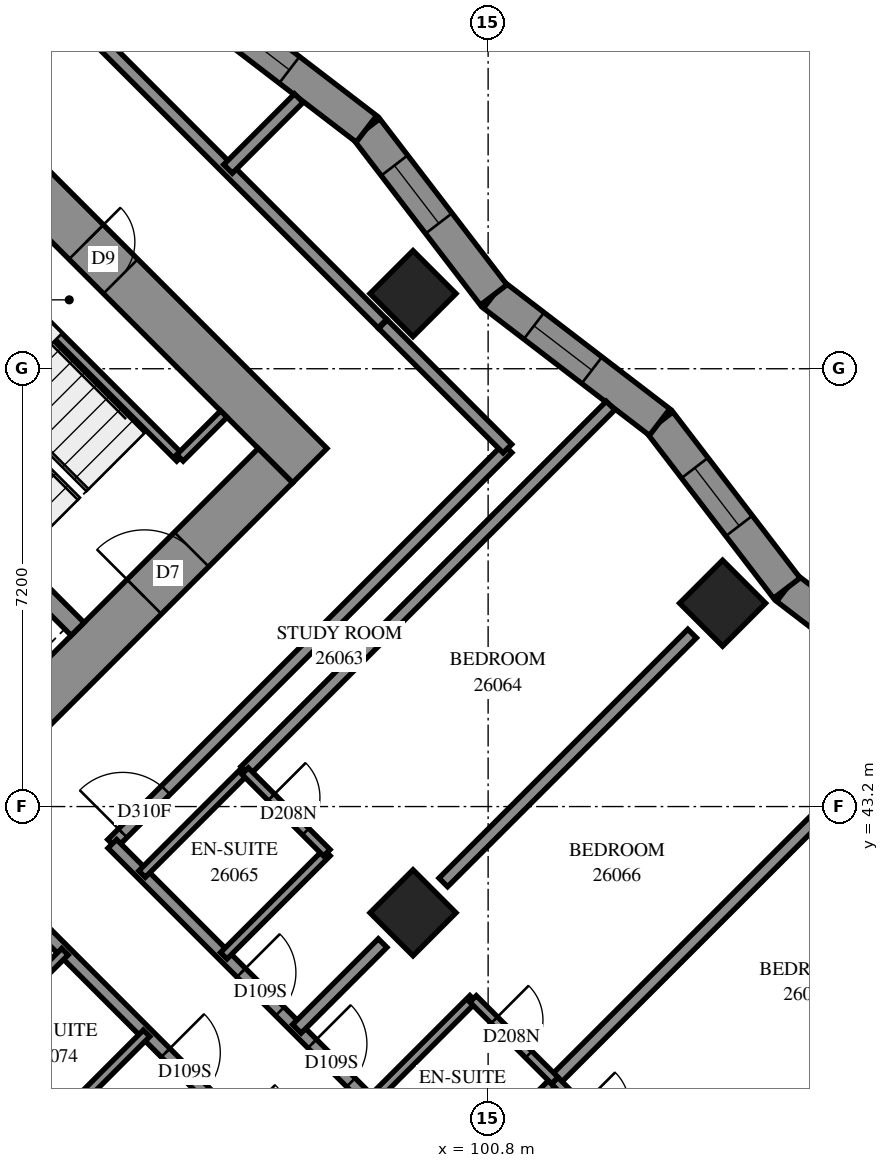
"""IFC4 building model, lengths in metres.
Left out: names, types, materials, properties, quantities, classifications, styles, units other than length and angle.
Written with IfcOpenShell. Run it as: python <this file> out.ifc"""

import sys

from ifc_helpers import new_model, si_unit, direction, frame, frame_2d, origin, origin_2d, place, context, subcontext, project, spatial, polyline, rectangle, outline, extrude, element, fill, save


model = new_model("IFC4")
c1 = context("Model", 3, precision=1e-05, world=origin(), true_north=direction((0.0, 1.0)))
c2 = subcontext(c1, "Body", "Model", "MODEL_VIEW")
j1 = project(units=[si_unit("LENGTHUNIT", "METRE"), si_unit("PLANEANGLEUNIT", "RADIAN")], contexts=[c1])
p1 = place(None, origin())
s1 = spatial("IfcSite", under=j1, at=p1, CompositionType="ELEMENT")
p2 = place(p1, origin())
s2 = spatial("IfcBuilding", under=s1, at=p2, CompositionType="ELEMENT")
p3 = place(p2, frame((0.0, 0.0, 98.2)))
s3 = spatial("IfcBuildingStorey", under=s2, at=p3, CompositionType="ELEMENT", Elevation=98.2)
for number, where, z_axis, x_axis in (
    (1, (99.565, 51.635, 0.0), (0.0, 0.0, 1.0), (0.707, -0.707, 0.0)),
    (2, (104.656, 46.544, 0.0), (0.0, 0.0, 1.0), (0.707, -0.707, 0.0)),
    (3, (99.565, 41.453, 0.0), (0.0, 0.0, 1.0), (0.707, -0.707, 0.0)),
):
    element("IfcColumn", number, at=place(p3, frame(where, z_axis=z_axis, x_axis=x_axis)), inside=s3, PredefinedType="COLUMN", context=c2, shape_type="SweptSolid", body=[
        extrude(rectangle(XDim=1.0, YDim=1.0, at=origin_2d()), origin(), (0.0, 0.0, 1.0), 3.1),
    ])
p4 = place(p3, frame((86.554, 60.121, -0.3), z_axis=(0.0, 0.0, 1.0), x_axis=(0.7071067812, -0.7071067812, 0.0)))
e4 = element("IfcWall", 4, at=p4, inside=s3, PredefinedType="SHEAR", context=c2, shape_type="SweptSolid", body=[
    extrude(rectangle(XDim=16.0, YDim=0.8, at=frame_2d((8.0, 0.0))), origin(), (0.0, 0.0, 1.0), 2.7),
])
p5 = place(p4, frame((10.8, 0.0, 0.3)))
e5 = element("IfcOpeningElement", 5, at=p5, cuts=e4, PredefinedType="OPENING", context=c2, shape_type="SweptSolid", body=[
    extrude(rectangle(XDim=0.8, YDim=2.1, at=frame_2d((0.4, 1.05))), frame((0.0, 0.41, 0.0), z_axis=(0.0, -1.0, 0.0), x_axis=(1.0, 0.0, 0.0)), (0.0, 0.0, 1.0), 0.82),
])
p6 = place(p3, frame((87.12, 38.625, -0.3), z_axis=(0.0, 0.0, 1.0), x_axis=(0.7071067812, 0.7071067812, 0.0)))
e6 = element("IfcWall", 6, at=p6, inside=s3, PredefinedType="SHEAR", context=c2, shape_type="SweptSolid", body=[
    extrude(rectangle(XDim=14.4, YDim=0.8, at=frame_2d((7.2, 0.0))), origin(), (0.0, 0.0, 1.0), 2.7),
])
p7 = place(p6, frame((4.55, 0.0, 0.3)))
e7 = element("IfcOpeningElement", 7, at=p7, cuts=e6, PredefinedType="OPENING", context=c2, shape_type="SweptSolid", body=[
    extrude(rectangle(XDim=1.1, YDim=2.1, at=frame_2d((0.55, 1.05))), frame((0.0, 0.41, 0.0), z_axis=(0.0, -1.0, 0.0), x_axis=(1.0, 0.0, 0.0)), (0.0, 0.0, 1.0), 0.82),
])
p8 = place(p6, frame((11.35, 0.0, 0.3)))
e8 = element("IfcOpeningElement", 8, at=p8, cuts=e6, PredefinedType="OPENING", context=c2, shape_type="SweptSolid", body=[
    extrude(rectangle(XDim=1.1, YDim=2.1, at=frame_2d((0.55, 1.05))), frame((0.0, 0.41, 0.0), z_axis=(0.0, -1.0, 0.0), x_axis=(1.0, 0.0, 0.0)), (0.0, 0.0, 1.0), 0.82),
])
p9 = place(p3, frame((88.958, 51.211, 0.0), z_axis=(0.0, 0.0, 1.0), x_axis=(0.7070998367, -0.7071137256, 0.0)))
e9 = element("IfcWall", 9, at=p9, inside=s3, PredefinedType="SOLIDWALL", context=c2, shape_type="SweptSolid", body=[
    extrude(rectangle(XDim=7.2, YDim=0.3, at=frame_2d((3.6, 0.0))), origin(), (0.0, 0.0, 1.0), 3.1),
])
p10 = place(p3, frame((108.442, 44.7, 0.0), z_axis=(0.0, 0.0, 1.0), x_axis=(-0.7937392534, 0.6082581669, 0.0)))
e10 = element("IfcWall", 10, at=p10, inside=s3, PredefinedType="SOLIDWALL", context=c2, shape_type="SweptSolid", body=[
    extrude(outline(polyline([(-0.036, -0.275), (3.403, -0.275), (3.475, 0.275), (0.036, 0.275), (-0.036, -0.275)])), origin(), (0.0, 0.0, 1.0), 3.1),
])
p11 = place(p10, frame((1.212, 0.0, 0.5)))
e11 = element("IfcOpeningElement", 11, at=p11, cuts=e10, PredefinedType="OPENING", context=c2, shape_type="SweptSolid", body=[
    extrude(rectangle(XDim=1.2, YDim=2.45, at=frame_2d((0.6, 1.225))), frame((0.0, 0.285, 0.0), z_axis=(0.0, -1.0, 0.0), x_axis=(1.0, 0.0, 0.0)), (0.0, 0.0, 1.0), 0.57),
])
p12 = place(p3, frame((105.712, 46.792, 0.0), z_axis=(0.0, 0.0, 1.0), x_axis=(-0.6082581669, 0.7937392534, 0.0)))
e12 = element("IfcWall", 12, at=p12, inside=s3, PredefinedType="SOLIDWALL", context=c2, shape_type="SweptSolid", body=[
    extrude(outline(polyline([(0.036, -0.275), (3.475, -0.275), (3.403, 0.275), (-0.036, 0.275), (0.036, -0.275)])), origin(), (0.0, 0.0, 1.0), 3.1),
])
p13 = place(p12, frame((1.29, 0.0, 0.5)))
e13 = element("IfcOpeningElement", 13, at=p13, cuts=e12, PredefinedType="OPENING", context=c2, shape_type="SweptSolid", body=[
    extrude(rectangle(XDim=1.2, YDim=2.45, at=frame_2d((0.6, 1.225))), frame((0.0, 0.285, 0.0), z_axis=(0.0, -1.0, 0.0), x_axis=(1.0, 0.0, 0.0)), (0.0, 0.0, 1.0), 0.57),
])
p14 = place(p3, frame((103.621, 49.522, 0.0), z_axis=(0.0, 0.0, 1.0), x_axis=(-0.7937392534, 0.6082581669, 0.0)))
e14 = element("IfcWall", 14, at=p14, inside=s3, PredefinedType="SOLIDWALL", context=c2, shape_type="SweptSolid", body=[
    extrude(outline(polyline([(-0.036, -0.275), (3.403, -0.275), (3.475, 0.275), (0.036, 0.275), (-0.036, -0.275)])), origin(), (0.0, 0.0, 1.0), 3.1),
])
p15 = place(p14, frame((1.404, 0.0, 0.5)))
e15 = element("IfcOpeningElement", 15, at=p15, cuts=e14, PredefinedType="OPENING", context=c2, shape_type="SweptSolid", body=[
    extrude(rectangle(XDim=1.2, YDim=2.45, at=frame_2d((0.6, 1.225))), frame((0.0, 0.285, 0.0), z_axis=(0.0, -1.0, 0.0), x_axis=(1.0, 0.0, 0.0)), (0.0, 0.0, 1.0), 0.57),
])
p16 = place(p3, frame((100.891, 51.614, 0.0), z_axis=(0.0, 0.0, 1.0), x_axis=(-0.6082581669, 0.7937392534, 0.0)))
e16 = element("IfcWall", 16, at=p16, inside=s3, PredefinedType="SOLIDWALL", context=c2, shape_type="SweptSolid", body=[
    extrude(outline(polyline([(0.036, -0.275), (3.475, -0.275), (3.403, 0.275), (-0.036, 0.275), (0.036, -0.275)])), origin(), (0.0, 0.0, 1.0), 3.1),
])
p17 = place(p16, frame((1.482, 0.0, 0.5)))
e17 = element("IfcOpeningElement", 17, at=p17, cuts=e16, PredefinedType="OPENING", context=c2, shape_type="SweptSolid", body=[
    extrude(rectangle(XDim=1.2, YDim=2.45, at=frame_2d((0.6, 1.225))), frame((0.0, 0.285, 0.0), z_axis=(0.0, -1.0, 0.0), x_axis=(1.0, 0.0, 0.0)), (0.0, 0.0, 1.0), 0.57),
])
p18 = place(p3, frame((98.799, 54.344, 0.0), z_axis=(0.0, 0.0, 1.0), x_axis=(-0.7937392534, 0.6082581669, 0.0)))
e18 = element("IfcWall", 18, at=p18, inside=s3, PredefinedType="SOLIDWALL", context=c2, shape_type="SweptSolid", body=[
    extrude(outline(polyline([(-0.036, -0.275), (3.403, -0.275), (3.475, 0.275), (0.036, 0.275), (-0.036, -0.275)])), origin(), (0.0, 0.0, 1.0), 3.1),
])
p19 = place(p18, frame((1.596, 0.0, 0.5)))
e19 = element("IfcOpeningElement", 19, at=p19, cuts=e18, PredefinedType="OPENING", context=c2, shape_type="SweptSolid", body=[
    extrude(rectangle(XDim=1.2, YDim=2.45, at=frame_2d((0.6, 1.225))), frame((0.0, 0.285, 0.0), z_axis=(0.0, -1.0, 0.0), x_axis=(1.0, 0.0, 0.0)), (0.0, 0.0, 1.0), 0.57),
])
p20 = place(p3, frame((91.313, 53.354, 0.0), z_axis=(0.0, 0.0, 1.0), x_axis=(0.7071147811, -0.7070987812, 0.0)))
e20 = element("IfcWall", 20, at=p20, inside=s3, PredefinedType="PARTITIONING", context=c2, shape_type="SweptSolid", body=[
    extrude(rectangle(XDim=6.25, YDim=0.15, at=frame_2d((3.125, 0.0))), origin(), (0.0, 0.0, 1.0), 3.1),
])
p21 = place(p3, frame((95.732, 48.934, 0.0), z_axis=(0.0, 0.0, 1.0), x_axis=(0.7071067812, 0.7071067812, 0.0)))
e21 = element("IfcWall", 21, at=p21, inside=s3, PredefinedType="PARTITIONING", context=c2, shape_type="SweptSolid", body=[
    extrude(rectangle(XDim=1.02, YDim=0.15, at=frame_2d((0.51, 0.0))), origin(), (0.0, 0.0, 1.0), 3.1),
])
p22 = place(p3, frame((93.339, 41.309, 0.0), z_axis=(0.0, 0.0, 1.0), x_axis=(0.7071067812, -0.7071067812, 0.0)))
e22 = element("IfcWall", 22, at=p22, inside=s3, PredefinedType="PARTITIONING", context=c2, shape_type="SweptSolid", body=[
    extrude(rectangle(XDim=18.702, YDim=0.2, at=frame_2d((9.351, 0.0))), origin(), (0.0, 0.0, 1.0), 3.1),
])
p23 = place(p22, frame((3.05, 0.0, 0.0)))
e23 = element("IfcOpeningElement", 23, at=p23, cuts=e22, PredefinedType="OPENING", context=c2, shape_type="SweptSolid", body=[
    extrude(rectangle(XDim=0.9, YDim=2.1, at=frame_2d((0.45, 1.05))), frame((0.0, 0.11, 0.0), z_axis=(0.0, -1.0, 0.0), x_axis=(1.0, 0.0, 0.0)), (0.0, 0.0, 1.0), 0.22),
])
p24 = place(p22, frame((4.7, 0.0, 0.0)))
e24 = element("IfcOpeningElement", 24, at=p24, cuts=e22, PredefinedType="OPENING", context=c2, shape_type="SweptSolid", body=[
    extrude(rectangle(XDim=0.9, YDim=2.1, at=frame_2d((0.45, 1.05))), frame((0.0, 0.11, 0.0), z_axis=(0.0, -1.0, 0.0), x_axis=(1.0, 0.0, 0.0)), (0.0, 0.0, 1.0), 0.22),
])
p25 = place(p22, frame((10.149, 0.0, 0.0)))
e25 = element("IfcOpeningElement", 25, at=p25, cuts=e22, PredefinedType="OPENING", context=c2, shape_type="SweptSolid", body=[
    extrude(rectangle(XDim=0.9, YDim=2.1, at=frame_2d((0.45, 1.05))), frame((0.0, 0.11, 0.0), z_axis=(0.0, -1.0, 0.0), x_axis=(1.0, 0.0, 0.0)), (0.0, 0.0, 1.0), 0.22),
])
p26 = place(p22, frame((11.9, 0.0, 0.0)))
e26 = element("IfcOpeningElement", 26, at=p26, cuts=e22, PredefinedType="OPENING", context=c2, shape_type="SweptSolid", body=[
    extrude(rectangle(XDim=0.9, YDim=2.1, at=frame_2d((0.45, 1.05))), frame((0.0, 0.11, 0.0), z_axis=(0.0, -1.0, 0.0), x_axis=(1.0, 0.0, 0.0)), (0.0, 0.0, 1.0), 0.22),
])
p27 = place(p22, frame((17.45, 0.0, 0.0)))
e27 = element("IfcOpeningElement", 27, at=p27, cuts=e22, PredefinedType="OPENING", context=c2, shape_type="SweptSolid", body=[
    extrude(rectangle(XDim=0.9, YDim=2.1, at=frame_2d((0.45, 1.05))), frame((0.0, 0.11, 0.0), z_axis=(0.0, -1.0, 0.0), x_axis=(1.0, 0.0, 0.0)), (0.0, 0.0, 1.0), 0.22),
])
p28 = place(p3, frame((94.615, 42.587, 0.0), z_axis=(0.0, 0.0, 1.0), x_axis=(0.7071067812, 0.7071067812, 0.0)))
e28 = element("IfcWall", 28, at=p28, inside=s3, PredefinedType="PARTITIONING", context=c2, shape_type="SweptSolid", body=[
    extrude(rectangle(XDim=9.198, YDim=0.2, at=frame_2d((4.599, 0.0))), origin(), (0.0, 0.0, 1.0), 3.1),
])
p29 = place(p28, frame((0.248, 0.0, 0.0)))
e29 = element("IfcOpeningElement", 29, at=p29, cuts=e28, PredefinedType="OPENING", context=c2, shape_type="SweptSolid", body=[
    extrude(rectangle(XDim=1.0, YDim=2.1, at=frame_2d((0.5, 1.05))), frame((0.0, 0.11, 0.0), z_axis=(0.0, -1.0, 0.0), x_axis=(1.0, 0.0, 0.0)), (0.0, 0.0, 1.0), 0.22),
])
p30 = place(p3, frame((101.896, 38.698, 0.0), z_axis=(0.0, 0.0, 1.0), x_axis=(0.7072296489, 0.7069838921, 0.0)))
e30 = element("IfcWall", 30, at=p30, inside=s3, PredefinedType="PARTITIONING", context=c2, shape_type="SweptSolid", body=[
    extrude(rectangle(XDim=8.545, YDim=0.2, at=frame_2d((4.272, 0.0))), origin(), (0.0, 0.0, 1.0), 3.1),
])
p31 = place(p3, frame((96.805, 43.787, 0.0), z_axis=(0.0, 0.0, 1.0), x_axis=(0.7071126661, 0.7071008962, 0.0)))
e31 = element("IfcWall", 31, at=p31, inside=s3, PredefinedType="PARTITIONING", context=c2, shape_type="SweptSolid", body=[
    extrude(rectangle(XDim=8.496, YDim=0.2, at=frame_2d((4.248, 0.0))), origin(), (0.0, 0.0, 1.0), 3.1),
])
p32 = place(p3, frame((94.62, 42.587, 0.0), z_axis=(0.0, 0.0, 1.0), x_axis=(0.7071067812, -0.7071067812, 0.0)))
e32 = element("IfcWall", 32, at=p32, inside=s3, PredefinedType="PARTITIONING", context=c2, shape_type="SweptSolid", body=[
    extrude(rectangle(XDim=7.9, YDim=0.2, at=frame_2d((3.95, 0.0))), origin(), (0.0, 0.0, 1.0), 3.1),
])
p33 = place(p32, frame((2.998, 0.0, 0.0)))
e33 = element("IfcOpeningElement", 33, at=p33, cuts=e32, PredefinedType="OPENING", context=c2, shape_type="SweptSolid", body=[
    extrude(rectangle(XDim=0.9, YDim=2.1, at=frame_2d((0.45, 1.05))), frame((0.0, 0.11, 0.0), z_axis=(0.0, -1.0, 0.0), x_axis=(1.0, 0.0, 0.0)), (0.0, 0.0, 1.0), 0.22),
])
p34 = place(p32, frame((4.649, 0.0, 0.0)))
e34 = element("IfcOpeningElement", 34, at=p34, cuts=e32, PredefinedType="OPENING", context=c2, shape_type="SweptSolid", body=[
    extrude(rectangle(XDim=0.9, YDim=2.1, at=frame_2d((0.45, 1.05))), frame((0.0, 0.11, 0.0), z_axis=(0.0, -1.0, 0.0), x_axis=(1.0, 0.0, 0.0)), (0.0, 0.0, 1.0), 0.22),
])
p35 = place(p3, frame((93.981, 56.223, 0.0), z_axis=(0.0, 0.0, 1.0), x_axis=(0.7071067812, -0.7071067812, 0.0)))
e35 = element("IfcWall", 35, at=p35, inside=s3, PredefinedType="PARTITIONING", context=c2, shape_type="SweptSolid", body=[
    extrude(rectangle(XDim=7.184, YDim=0.2, at=frame_2d((3.592, 0.0))), origin(), (0.0, 0.0, 1.0), 3.1),
])
for number, where, z_axis, x_axis in (
    (36, (105.155, 36.863, 0.0), (0.0, 0.0, 1.0), (0.707, 0.707, 0.0)),
    (37, (100.063, 41.953, 0.0), (0.0, 0.0, 1.0), (0.707, 0.707, 0.0)),
):
    element("IfcWall", number, at=place(p3, frame(where, z_axis=z_axis, x_axis=x_axis)), inside=s3, PredefinedType="PARTITIONING", context=c2, shape_type="SweptSolid", body=[
        extrude(rectangle(XDim=5.787, YDim=0.2, at=frame_2d((2.893, 0.0))), origin(), (0.0, 0.0, 1.0), 3.1),
    ])
p36 = place(p3, frame((99.071, 51.133, 0.0), z_axis=(0.0, 0.0, 1.0), x_axis=(0.7071067812, -0.7071067812, 0.0)))
e38 = element("IfcWall", 38, at=p36, inside=s3, PredefinedType="PARTITIONING", context=c2, shape_type="SweptSolid", body=[
    extrude(rectangle(XDim=2.893, YDim=0.2, at=frame_2d((1.447, 0.0))), origin(), (0.0, 0.0, 1.0), 3.1),
])
for number, where, z_axis, x_axis in (
    (39, (92.143, 39.117, 0.0), (0.0, 0.0, 1.0), (0.708, 0.707, 0.0)),
    (40, (93.487, 37.773, 0.0), (0.0, 0.0, 1.0), (0.707, 0.708, 0.0)),
    (41, (100.203, 36.997, 0.0), (0.0, 0.0, 1.0), (0.707, 0.708, 0.0)),
):
    element("IfcWall", number, at=place(p3, frame(where, z_axis=z_axis, x_axis=x_axis)), inside=s3, PredefinedType="PARTITIONING", context=c2, shape_type="SweptSolid", body=[
        extrude(rectangle(XDim=2.4, YDim=0.15, at=frame_2d((1.2, 0.0))), origin(), (0.0, 0.0, 1.0), 3.1),
    ])
for number, where, z_axis, x_axis in (
    (42, (96.453, 40.747, 0.0), (0.0, 0.0, 1.0), (0.707, 0.707, 0.0)),
    (43, (95.109, 42.091, 0.0), (0.0, 0.0, 1.0), (0.707, 0.707, 0.0)),
    (44, (98.857, 38.343, 0.0), (0.0, 0.0, 1.0), (0.707, 0.707, 0.0)),
):
    element("IfcWall", number, at=place(p3, frame(where, z_axis=z_axis, x_axis=x_axis)), inside=s3, PredefinedType="PARTITIONING", context=c2, shape_type="SweptSolid", body=[
        extrude(rectangle(XDim=2.398, YDim=0.15, at=frame_2d((1.199, 0.0))), origin(), (0.0, 0.0, 1.0), 3.1),
    ])
p37 = place(p3, frame((97.655, 39.545, 0.0), z_axis=(0.0, 0.0, 1.0), x_axis=(0.7071067812, 0.7071067812, 0.0)))
e45 = element("IfcWall", 45, at=p37, inside=s3, PredefinedType="PARTITIONING", context=c2, shape_type="SweptSolid", body=[
    extrude(rectangle(XDim=1.994, YDim=0.2, at=frame_2d((0.997, 0.0))), origin(), (0.0, 0.0, 1.0), 3.1),
])
p38 = place(p3, frame((96.803, 43.783, 0.0), z_axis=(0.0, 0.0, 1.0), x_axis=(0.7071067812, -0.7071067812, 0.0)))
e46 = element("IfcWall", 46, at=p38, inside=s3, PredefinedType="PARTITIONING", context=c2, shape_type="SweptSolid", body=[
    extrude(rectangle(XDim=1.901, YDim=0.15, at=frame_2d((0.95, 0.0))), origin(), (0.0, 0.0, 1.0), 3.1),
])
p39 = place(p38, frame((0.609, 0.0, 0.0)))
e47 = element("IfcOpeningElement", 47, at=p39, cuts=e46, PredefinedType="OPENING", context=c2, shape_type="SweptSolid", body=[
    extrude(rectangle(XDim=0.8, YDim=2.1, at=frame_2d((0.4, 1.05))), frame((0.0, 0.085, 0.0), z_axis=(0.0, -1.0, 0.0), x_axis=(1.0, 0.0, 0.0)), (0.0, 0.0, 1.0), 0.17),
])
p40 = place(p3, frame((101.894, 38.693, 0.0), z_axis=(0.0, 0.0, 1.0), x_axis=(0.7071067812, -0.7071067812, 0.0)))
e48 = element("IfcWall", 48, at=p40, inside=s3, PredefinedType="PARTITIONING", context=c2, shape_type="SweptSolid", body=[
    extrude(rectangle(XDim=1.901, YDim=0.15, at=frame_2d((0.95, 0.0))), origin(), (0.0, 0.0, 1.0), 3.1),
])
p41 = place(p40, frame((0.608, 0.0, 0.0)))
e49 = element("IfcOpeningElement", 49, at=p41, cuts=e48, PredefinedType="OPENING", context=c2, shape_type="SweptSolid", body=[
    extrude(rectangle(XDim=0.8, YDim=2.1, at=frame_2d((0.4, 1.05))), frame((0.0, 0.085, 0.0), z_axis=(0.0, -1.0, 0.0), x_axis=(1.0, 0.0, 0.0)), (0.0, 0.0, 1.0), 0.17),
])
p42 = place(p3, frame((100.553, 40.037, 0.0), z_axis=(0.0, 0.0, 1.0), x_axis=(0.7076330979, -0.7065800724, 0.0)))
e50 = element("IfcWall", 50, at=p42, inside=s3, PredefinedType="PARTITIONING", context=c2, shape_type="SweptSolid", body=[
    extrude(rectangle(XDim=1.899, YDim=0.15, at=frame_2d((0.95, 0.0))), origin(), (0.0, 0.0, 1.0), 3.1),
])
p43 = place(p42, frame((0.493, 0.0, 0.0)))
e51 = element("IfcOpeningElement", 51, at=p43, cuts=e50, PredefinedType="OPENING", context=c2, shape_type="SweptSolid", body=[
    extrude(rectangle(XDim=0.8, YDim=2.1, at=frame_2d((0.4, 1.05))), frame((0.0, 0.085, 0.0), z_axis=(0.0, -1.0, 0.0), x_axis=(1.0, 0.0, 0.0)), (0.0, 0.0, 1.0), 0.17),
])
p44 = place(p3, frame((96.523, 53.687, 0.0), z_axis=(0.0, 0.0, 1.0), x_axis=(0.7070763817, 0.7071371793, 0.0)))
e52 = element("IfcWall", 52, at=p44, inside=s3, PredefinedType="PARTITIONING", context=c2, shape_type="SweptSolid", body=[
    extrude(rectangle(XDim=1.645, YDim=0.2, at=frame_2d((0.822, 0.0))), origin(), (0.0, 0.0, 1.0), 3.1),
])
p45 = place(p13, origin())
e53 = element("IfcWindow", 53, at=p45, inside=s3, PartitioningType="SINGLE_PANEL", PredefinedType="WINDOW", context=c2, shape_type="SweptSolid", body=[
    extrude(rectangle(XDim=1.2, YDim=2.45, at=frame_2d((0.6, 1.225))), frame((0.0, 0.155, 0.0), z_axis=(0.0, -1.0, 0.0), x_axis=(1.0, 0.0, 0.0)), (0.0, 0.0, 1.0), 0.06),
])
fill(e13, e53)
p46 = place(p15, origin())
e54 = element("IfcWindow", 54, at=p46, inside=s3, PartitioningType="SINGLE_PANEL", PredefinedType="WINDOW", context=c2, shape_type="SweptSolid", body=[
    extrude(rectangle(XDim=1.2, YDim=2.45, at=frame_2d((0.6, 1.225))), frame((0.0, 0.155, 0.0), z_axis=(0.0, -1.0, 0.0), x_axis=(1.0, 0.0, 0.0)), (0.0, 0.0, 1.0), 0.06),
])
fill(e15, e54)
p47 = place(p17, origin())
e55 = element("IfcWindow", 55, at=p47, inside=s3, PartitioningType="SINGLE_PANEL", PredefinedType="WINDOW", context=c2, shape_type="SweptSolid", body=[
    extrude(rectangle(XDim=1.2, YDim=2.45, at=frame_2d((0.6, 1.225))), frame((0.0, 0.155, 0.0), z_axis=(0.0, -1.0, 0.0), x_axis=(1.0, 0.0, 0.0)), (0.0, 0.0, 1.0), 0.06),
])
fill(e17, e55)
p48 = place(p19, origin())
e56 = element("IfcWindow", 56, at=p48, inside=s3, PartitioningType="SINGLE_PANEL", PredefinedType="WINDOW", context=c2, shape_type="SweptSolid", body=[
    extrude(rectangle(XDim=1.2, YDim=2.45, at=frame_2d((0.6, 1.225))), frame((0.0, 0.155, 0.0), z_axis=(0.0, -1.0, 0.0), x_axis=(1.0, 0.0, 0.0)), (0.0, 0.0, 1.0), 0.06),
])
fill(e19, e56)
p49 = place(p5, origin())
e57 = element("IfcDoor", 57, at=p49, inside=s3, OperationType="SINGLE_SWING_RIGHT", PredefinedType="DOOR", context=c2, shape_type="SweptSolid", body=[
    extrude(rectangle(XDim=0.8, YDim=2.1, at=frame_2d((0.4, 1.05))), frame((0.0, -0.34, 0.0), z_axis=(0.0, -1.0, 0.0), x_axis=(1.0, 0.0, 0.0)), (0.0, 0.0, 1.0), 0.05),
])
fill(e5, e57)
p50 = place(p8, origin())
e58 = element("IfcDoor", 58, at=p50, inside=s3, OperationType="SINGLE_SWING_RIGHT", PredefinedType="DOOR", context=c2, shape_type="SweptSolid", body=[
    extrude(rectangle(XDim=1.1, YDim=2.1, at=frame_2d((0.55, 1.05))), frame((0.0, 0.025, 0.0), z_axis=(0.0, -1.0, 0.0), x_axis=(1.0, 0.0, 0.0)), (0.0, 0.0, 1.0), 0.05),
])
fill(e8, e58)
p51 = place(p29, origin())
e59 = element("IfcDoor", 59, at=p51, inside=s3, OperationType="SINGLE_SWING_RIGHT", PredefinedType="DOOR", context=c2, shape_type="SweptSolid", body=[
    extrude(rectangle(XDim=1.0, YDim=2.1, at=frame_2d((0.5, 1.05))), frame((0.0, 0.025, 0.0), z_axis=(0.0, -1.0, 0.0), x_axis=(1.0, 0.0, 0.0)), (0.0, 0.0, 1.0), 0.05),
])
fill(e29, e59)
p52 = place(p33, origin())
e60 = element("IfcDoor", 60, at=p52, inside=s3, OperationType="SINGLE_SWING_RIGHT", PredefinedType="DOOR", context=c2, shape_type="SweptSolid", body=[
    extrude(rectangle(XDim=0.9, YDim=2.1, at=frame_2d((0.45, 1.05))), frame((0.0, 0.025, 0.0), z_axis=(0.0, -1.0, 0.0), x_axis=(1.0, 0.0, 0.0)), (0.0, 0.0, 1.0), 0.05),
])
fill(e33, e60)
p53 = place(p39, origin())
e61 = element("IfcDoor", 61, at=p53, inside=s3, OperationType="SINGLE_SWING_RIGHT", PredefinedType="DOOR", context=c2, shape_type="SweptSolid", body=[
    extrude(rectangle(XDim=0.8, YDim=2.1, at=frame_2d((0.4, 1.05))), frame((0.0, 0.025, 0.0), z_axis=(0.0, -1.0, 0.0), x_axis=(1.0, 0.0, 0.0)), (0.0, 0.0, 1.0), 0.05),
])
fill(e47, e61)
p54 = place(p34, origin())
e62 = element("IfcDoor", 62, at=p54, inside=s3, OperationType="SINGLE_SWING_LEFT", PredefinedType="DOOR", context=c2, shape_type="SweptSolid", body=[
    extrude(rectangle(XDim=0.9, YDim=2.1, at=frame_2d((0.45, 1.05))), frame((0.0, 0.025, 0.0), z_axis=(0.0, -1.0, 0.0), x_axis=(1.0, 0.0, 0.0)), (0.0, 0.0, 1.0), 0.05),
])
fill(e34, e62)
p55 = place(p43, origin())
e63 = element("IfcDoor", 63, at=p55, inside=s3, OperationType="SINGLE_SWING_RIGHT", PredefinedType="DOOR", context=c2, shape_type="SweptSolid", body=[
    extrude(rectangle(XDim=0.8, YDim=2.1, at=frame_2d((0.4, 1.05))), frame((0.0, 0.025, 0.0), z_axis=(0.0, -1.0, 0.0), x_axis=(1.0, 0.0, 0.0)), (0.0, 0.0, 1.0), 0.05),
])
fill(e51, e63)
p56 = place(p23, origin())
e64 = element("IfcDoor", 64, at=p56, inside=s3, OperationType="SINGLE_SWING_LEFT", PredefinedType="DOOR", context=c2, shape_type="SweptSolid", body=[
    extrude(rectangle(XDim=0.9, YDim=2.1, at=frame_2d((0.45, 1.05))), frame((0.0, 0.025, 0.0), z_axis=(0.0, -1.0, 0.0), x_axis=(1.0, 0.0, 0.0)), (0.0, 0.0, 1.0), 0.05),
])
fill(e23, e64)
save(model, sys.argv[1])
